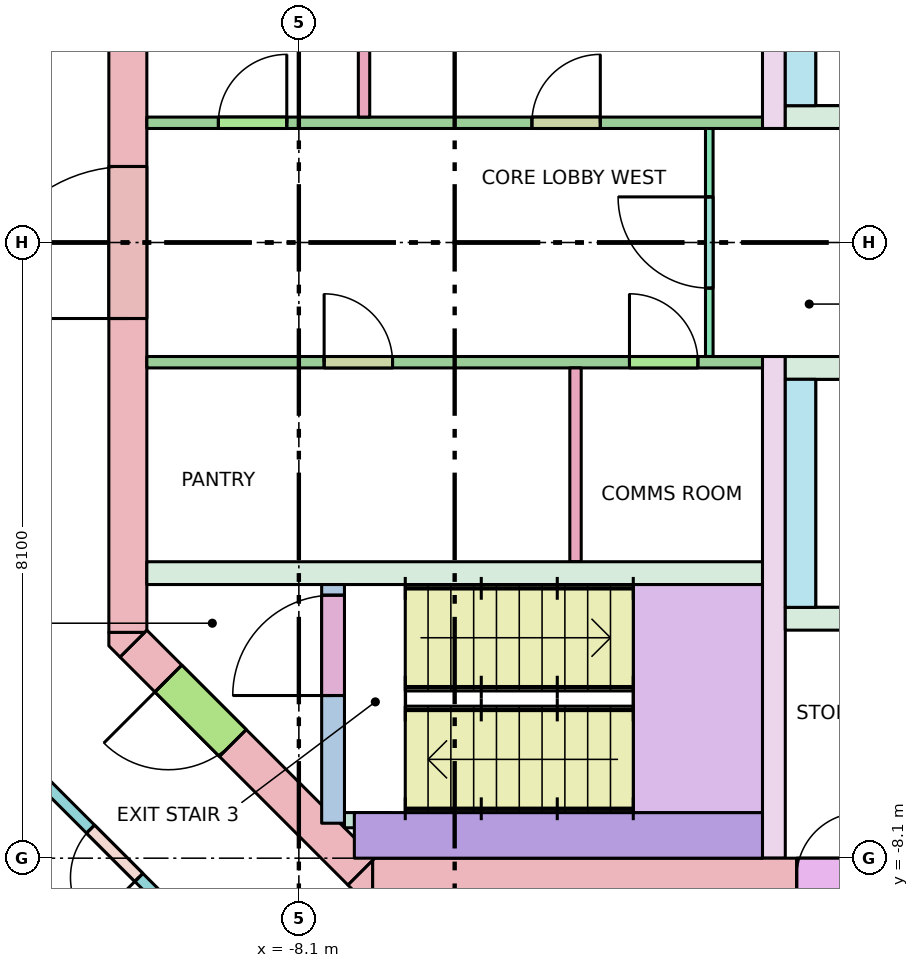
"""IFC4 building model, lengths in metres.
Left out: names, types, materials, properties, quantities, classifications, styles, units other than length and angle.
Written with IfcOpenShell. Run it as: python <this file> out.ifc"""

import sys

from ifc_helpers import new_model, si_unit, direction, frame, frame_2d, origin, place, context, subcontext, project, spatial, polyline, rectangle, outline, extrude, element, fill, save


model = new_model("IFC4")
c1 = context("Model", 3, precision=1e-05, world=origin(), true_north=direction((0.0, 1.0)))
c2 = subcontext(c1, "Body", "Model", "MODEL_VIEW")
j1 = project(units=[si_unit("LENGTHUNIT", "METRE"), si_unit("PLANEANGLEUNIT", "RADIAN")], contexts=[c1])
p1 = place(None, origin())
s1 = spatial("IfcSite", under=j1, at=p1, CompositionType="ELEMENT")
p2 = place(p1, origin())
s2 = spatial("IfcBuilding", under=s1, at=p2, CompositionType="ELEMENT")
p3 = place(p2, frame((0.0, 0.0, 272.3)))
s3 = spatial("IfcBuildingStorey", under=s2, at=p3, CompositionType="ELEMENT", Elevation=272.3)
p4 = place(p3, frame((-7.13, -8.35, -0.28), z_axis=(0.0, 0.0, 1.0), x_axis=(1.0, 0.0, 0.0)))
e1 = element("IfcWall", 1, at=p4, inside=s3, PredefinedType="SHEAR", context=c2, shape_type="SweptSolid", body=[
    extrude(rectangle(XDim=14.26, YDim=0.5, at=frame_2d((7.13, 0.0))), origin(), (0.0, 0.0, 1.0), 3.7),
])
p5 = place(p4, frame((8.08, 0.0, 0.28)))
e2 = element("IfcOpeningElement", 2, at=p5, cuts=e1, PredefinedType="OPENING", context=c2, shape_type="SweptSolid", body=[
    extrude(rectangle(XDim=0.7, YDim=2.1, at=frame_2d((0.35, 1.05))), frame((0.0, 0.26, 0.0), z_axis=(0.0, -1.0, 0.0), x_axis=(1.0, 0.0, 0.0)), (0.0, 0.0, 1.0), 0.52),
])
p6 = place(p4, frame((5.58, 0.0, 0.28)))
e3 = element("IfcOpeningElement", 3, at=p6, cuts=e1, PredefinedType="OPENING", context=c2, shape_type="SweptSolid", body=[
    extrude(rectangle(XDim=0.85, YDim=2.1, at=frame_2d((0.425, 1.05))), frame((0.0, 0.26, 0.0), z_axis=(0.0, -1.0, 0.0), x_axis=(1.0, 0.0, 0.0)), (0.0, 0.0, 1.0), 0.52),
])
p7 = place(p4, frame((6.88, 0.0, 0.28)))
e4 = element("IfcOpeningElement", 4, at=p7, cuts=e1, PredefinedType="OPENING", context=c2, shape_type="SweptSolid", body=[
    extrude(rectangle(XDim=0.85, YDim=2.1, at=frame_2d((0.425, 1.05))), frame((0.0, 0.26, 0.0), z_axis=(0.0, -1.0, 0.0), x_axis=(1.0, 0.0, 0.0)), (0.0, 0.0, 1.0), 0.52),
])
p8 = place(p4, frame((9.445, 0.0, 0.28)))
e5 = element("IfcOpeningElement", 5, at=p8, cuts=e1, PredefinedType="OPENING", context=c2, shape_type="SweptSolid", body=[
    extrude(rectangle(XDim=0.9, YDim=2.1, at=frame_2d((0.45, 1.05))), frame((0.0, 0.26, 0.0), z_axis=(0.0, -1.0, 0.0), x_axis=(1.0, 0.0, 0.0)), (0.0, 0.0, 1.0), 0.52),
])
p9 = place(p4, frame((11.431, 0.0, 0.28)))
e6 = element("IfcOpeningElement", 6, at=p9, cuts=e1, PredefinedType="OPENING", context=c2, shape_type="SweptSolid", body=[
    extrude(rectangle(XDim=0.9, YDim=2.1, at=frame_2d((0.45, 1.05))), frame((0.0, 0.26, 0.0), z_axis=(0.0, -1.0, 0.0), x_axis=(1.0, 0.0, 0.0)), (0.0, 0.0, 1.0), 0.52),
])
p10 = place(p3, frame((-10.35, -5.13, -0.28), z_axis=(0.0, 0.0, 1.0), x_axis=(0.0, 1.0, 0.0)))
e7 = element("IfcWall", 7, at=p10, inside=s3, PredefinedType="SHEAR", context=c2, shape_type="SweptSolid", body=[
    extrude(rectangle(XDim=10.26, YDim=0.5, at=frame_2d((5.13, 0.0))), origin(), (0.0, 0.0, 1.0), 3.7),
])
p11 = place(p10, frame((4.13, 0.0, 0.28)))
e8 = element("IfcOpeningElement", 8, at=p11, cuts=e7, PredefinedType="OPENING", context=c2, shape_type="SweptSolid", body=[
    extrude(rectangle(XDim=2.0, YDim=2.1, at=frame_2d((1.0, 1.05))), frame((0.0, 0.26, 0.0), z_axis=(0.0, -1.0, 0.0), x_axis=(1.0, 0.0, 0.0)), (0.0, 0.0, 1.0), 0.52),
])
p12 = place(p3, frame((-7.277, -8.277, -0.28), z_axis=(0.0, 0.0, 1.0), x_axis=(-0.707106781187, 0.707106781187, 0.0)))
e9 = element("IfcWall", 9, at=p12, inside=s3, PredefinedType="SHEAR", context=c2, shape_type="SweptSolid", body=[
    extrude(rectangle(XDim=4.243, YDim=0.5, at=frame_2d((2.121, 0.0))), origin(), (0.0, 0.0, 1.0), 3.7),
])
p13 = place(p12, frame((2.393, 0.0, 0.28)))
e10 = element("IfcOpeningElement", 10, at=p13, cuts=e9, PredefinedType="OPENING", context=c2, shape_type="SweptSolid", body=[
    extrude(rectangle(XDim=1.2, YDim=2.1, at=frame_2d((0.6, 1.05))), frame((0.0, 0.26, 0.0), z_axis=(0.0, -1.0, 0.0), x_axis=(1.0, 0.0, 0.0)), (0.0, 0.0, 1.0), 0.52),
])
p14 = place(p3, frame((0.0, 0.0, -0.28)))
e11 = element("IfcWall", 11, at=p14, inside=s3, PredefinedType="SHEAR", context=c2, shape_type="SweptSolid", body=[
    extrude(outline(polyline([(-7.307, -8.6), (-7.454, -8.454), (-7.13, -8.13), (-7.13, -8.6), (-7.307, -8.6)])), origin(), (0.0, 0.0, 1.0), 3.7),
])
p15 = place(p3, frame((0.0, 0.0, -0.28)))
e12 = element("IfcWall", 12, at=p15, inside=s3, PredefinedType="SHEAR", context=c2, shape_type="SweptSolid", body=[
    extrude(outline(polyline([(-10.6, -5.307), (-10.6, -5.13), (-10.13, -5.13), (-10.454, -5.454), (-10.6, -5.307)])), origin(), (0.0, 0.0, 1.0), 3.7),
])
p16 = place(p3, frame((-10.1, -4.35, 0.0), z_axis=(0.0, 0.0, 1.0), x_axis=(1.0, 0.0, 0.0)))
e13 = element("IfcWall", 13, at=p16, inside=s3, PredefinedType="SOLIDWALL", context=c2, shape_type="SweptSolid", body=[
    extrude(rectangle(XDim=8.1, YDim=0.3, at=frame_2d((4.05, 0.0))), origin(), (0.0, 0.0, 1.0), 3.42),
])
for number, where, z_axis, x_axis in (
    (14, (-1.85, 1.5, 0.0), (0.0, 0.0, 1.0), (0.0, 1.0, 0.0)),
    (15, (-1.85, -8.1, 0.0), (0.0, 0.0, 1.0), (0.0, 1.0, 0.0)),
):
    element("IfcWall", number, at=place(p3, frame(where, z_axis=z_axis, x_axis=x_axis)), inside=s3, PredefinedType="SHEAR", context=c2, shape_type="SweptSolid", body=[
        extrude(rectangle(XDim=6.6, YDim=0.3, at=frame_2d((3.3, 0.0))), origin(), (0.0, 0.0, 1.0), 3.42),
    ])
p17 = place(p3, frame((-1.7, 1.65, 0.0), z_axis=(0.0, 0.0, 1.0), x_axis=(1.0, 0.0, 0.0)))
e16 = element("IfcWall", 16, at=p17, inside=s3, PredefinedType="SOLIDWALL", context=c2, shape_type="SweptSolid", body=[
    extrude(rectangle(XDim=3.4, YDim=0.3, at=frame_2d((1.7, 0.0))), origin(), (0.0, 0.0, 1.0), 3.42),
])
p18 = place(p17, frame((1.15, 0.0, 0.0)))
e17 = element("IfcOpeningElement", 17, at=p18, cuts=e16, PredefinedType="OPENING", context=c2, shape_type="SweptSolid", body=[
    extrude(rectangle(XDim=1.1, YDim=2.1, at=frame_2d((0.55, 1.05))), frame((0.0, 0.16, 0.0), z_axis=(0.0, -1.0, 0.0), x_axis=(1.0, 0.0, 0.0)), (0.0, 0.0, 1.0), 0.32),
])
p19 = place(p3, frame((-1.7, -1.65, 0.0), z_axis=(0.0, 0.0, 1.0), x_axis=(1.0, 0.0, 0.0)))
e18 = element("IfcWall", 18, at=p19, inside=s3, PredefinedType="SOLIDWALL", context=c2, shape_type="SweptSolid", body=[
    extrude(rectangle(XDim=3.4, YDim=0.3, at=frame_2d((1.7, 0.0))), origin(), (0.0, 0.0, 1.0), 3.42),
])
p20 = place(p19, frame((1.15, 0.0, 0.0)))
e19 = element("IfcOpeningElement", 19, at=p20, cuts=e18, PredefinedType="OPENING", context=c2, shape_type="SweptSolid", body=[
    extrude(rectangle(XDim=1.1, YDim=2.1, at=frame_2d((0.55, 1.05))), frame((0.0, 0.16, 0.0), z_axis=(0.0, -1.0, 0.0), x_axis=(1.0, 0.0, 0.0)), (0.0, 0.0, 1.0), 0.32),
])
for number, where, z_axis, x_axis in (
    (20, (-1.5, 1.8, 0.0), (0.0, 0.0, 1.0), (0.0, 1.0, 0.0)),
    (21, (-1.5, -4.8, 0.0), (0.0, 0.0, 1.0), (0.0, 1.0, 0.0)),
):
    element("IfcWall", number, at=place(p3, frame(where, z_axis=z_axis, x_axis=x_axis)), inside=s3, PredefinedType="SOLIDWALL", context=c2, shape_type="SweptSolid", body=[
        extrude(rectangle(XDim=3.0, YDim=0.4, at=frame_2d((1.5, 0.0))), origin(), (0.0, 0.0, 1.0), 3.42),
    ])
p21 = place(p3, frame((-1.7, -4.95, 0.0), z_axis=(0.0, 0.0, 1.0), x_axis=(1.0, 0.0, 0.0)))
e22 = element("IfcWall", 22, at=p21, inside=s3, PredefinedType="SOLIDWALL", context=c2, shape_type="SweptSolid", body=[
    extrude(rectangle(XDim=3.4, YDim=0.3, at=frame_2d((1.7, 0.0))), origin(), (0.0, 0.0, 1.0), 3.42),
])
p22 = place(p3, frame((-7.65, -7.64, 0.0), z_axis=(0.0, 0.0, 1.0), x_axis=(0.0, 1.0, 0.0)))
e23 = element("IfcWall", 23, at=p22, inside=s3, PredefinedType="SHEAR", context=c2, shape_type="SweptSolid", body=[
    extrude(rectangle(XDim=3.14, YDim=0.3, at=frame_2d((1.57, 0.0))), origin(), (0.0, 0.0, 1.0), 3.42),
])
p23 = place(p22, frame((1.68, 0.0, 0.0)))
e24 = element("IfcOpeningElement", 24, at=p23, cuts=e23, PredefinedType="OPENING", context=c2, shape_type="SweptSolid", body=[
    extrude(rectangle(XDim=1.32, YDim=2.1, at=frame_2d((0.66, 1.05))), frame((0.0, 0.16, 0.0), z_axis=(0.0, -1.0, 0.0), x_axis=(1.0, 0.0, 0.0)), (0.0, 0.0, 1.0), 0.32),
])
p24 = place(p3, frame((-7.5, -7.6, 0.0), z_axis=(0.0, 0.0, 1.0), x_axis=(1.0, 0.0, 0.0)))
e25 = element("IfcWall", 25, at=p24, inside=s3, PredefinedType="SHEAR", context=c2, shape_type="SweptSolid", body=[
    extrude(rectangle(XDim=0.6, YDim=0.2, at=frame_2d((0.3, 0.0))), origin(), (0.0, 0.0, 1.0), 3.42),
])
p25 = place(p3, frame((-7.37, -7.8, 0.0), z_axis=(0.0, 0.0, 1.0), x_axis=(1.0, 0.0, 0.0)))
e26 = element("IfcWall", 26, at=p25, inside=s3, PredefinedType="SHEAR", context=c2, shape_type="SweptSolid", body=[
    extrude(rectangle(XDim=5.37, YDim=0.6, at=frame_2d((2.685, 0.0))), origin(), (0.0, 0.0, 1.0), 3.42),
])
p26 = place(p3, frame((-2.7, -1.5, 0.0), z_axis=(0.0, 0.0, 1.0), x_axis=(0.0, 1.0, 0.0)))
e27 = element("IfcWall", 27, at=p26, inside=s3, PredefinedType="PARTITIONING", context=c2, shape_type="SweptSolid", body=[
    extrude(rectangle(XDim=3.0, YDim=0.1, at=frame_2d((1.5, 0.0))), origin(), (0.0, 0.0, 1.0), 3.42),
])
p27 = place(p26, frame((0.9, 0.0, 0.0)))
e28 = element("IfcOpeningElement", 28, at=p27, cuts=e27, PredefinedType="OPENING", context=c2, shape_type="SweptSolid", body=[
    extrude(rectangle(XDim=1.2, YDim=2.1, at=frame_2d((0.6, 1.05))), frame((0.0, 0.06, 0.0), z_axis=(0.0, -1.0, 0.0), x_axis=(1.0, 0.0, 0.0)), (0.0, 0.0, 1.0), 0.12),
])
for number, where, z_axis, x_axis in (
    (29, (-7.242, 1.65, 0.0), (0.0, 0.0, 1.0), (0.0, 1.0, 0.0)),
    (30, (-4.46, -4.2, 0.0), (0.0, 0.0, 1.0), (0.0, 1.0, 0.0)),
):
    element("IfcWall", number, at=place(p3, frame(where, z_axis=z_axis, x_axis=x_axis)), inside=s3, PredefinedType="PARTITIONING", context=c2, shape_type="SweptSolid", body=[
        extrude(rectangle(XDim=2.55, YDim=0.15, at=frame_2d((1.275, 0.0))), origin(), (0.0, 0.0, 1.0), 3.42),
    ])
p28 = place(p3, frame((-10.1, 1.575, 0.0), z_axis=(0.0, 0.0, 1.0), x_axis=(1.0, 0.0, 0.0)))
e31 = element("IfcWall", 31, at=p28, inside=s3, PredefinedType="PARTITIONING", context=c2, shape_type="SweptSolid", body=[
    extrude(rectangle(XDim=8.1, YDim=0.15, at=frame_2d((4.05, 0.0))), origin(), (0.0, 0.0, 1.0), 3.42),
])
p29 = place(p28, frame((0.941, 0.0, 0.0)))
e32 = element("IfcOpeningElement", 32, at=p29, cuts=e31, PredefinedType="OPENING", context=c2, shape_type="SweptSolid", body=[
    extrude(rectangle(XDim=0.9, YDim=2.1, at=frame_2d((0.45, 1.05))), frame((0.0, 0.085, 0.0), z_axis=(0.0, -1.0, 0.0), x_axis=(1.0, 0.0, 0.0)), (0.0, 0.0, 1.0), 0.17),
])
p30 = place(p28, frame((5.066, 0.0, 0.0)))
e33 = element("IfcOpeningElement", 33, at=p30, cuts=e31, PredefinedType="OPENING", context=c2, shape_type="SweptSolid", body=[
    extrude(rectangle(XDim=0.9, YDim=2.1, at=frame_2d((0.45, 1.05))), frame((0.0, 0.085, 0.0), z_axis=(0.0, -1.0, 0.0), x_axis=(1.0, 0.0, 0.0)), (0.0, 0.0, 1.0), 0.17),
])
p31 = place(p3, frame((-10.1, -1.575, 0.0), z_axis=(0.0, 0.0, 1.0), x_axis=(1.0, 0.0, 0.0)))
e34 = element("IfcWall", 34, at=p31, inside=s3, PredefinedType="PARTITIONING", context=c2, shape_type="SweptSolid", body=[
    extrude(rectangle(XDim=8.1, YDim=0.15, at=frame_2d((4.05, 0.0))), origin(), (0.0, 0.0, 1.0), 3.42),
])
p32 = place(p31, frame((2.333, 0.0, 0.0)))
e35 = element("IfcOpeningElement", 35, at=p32, cuts=e34, PredefinedType="OPENING", context=c2, shape_type="SweptSolid", body=[
    extrude(rectangle(XDim=0.9, YDim=2.1, at=frame_2d((0.45, 1.05))), frame((0.0, 0.085, 0.0), z_axis=(0.0, -1.0, 0.0), x_axis=(1.0, 0.0, 0.0)), (0.0, 0.0, 1.0), 0.17),
])
p33 = place(p31, frame((6.35, 0.0, 0.0)))
e36 = element("IfcOpeningElement", 36, at=p33, cuts=e34, PredefinedType="OPENING", context=c2, shape_type="SweptSolid", body=[
    extrude(rectangle(XDim=0.9, YDim=2.1, at=frame_2d((0.45, 1.05))), frame((0.0, 0.085, 0.0), z_axis=(0.0, -1.0, 0.0), x_axis=(1.0, 0.0, 0.0)), (0.0, 0.0, 1.0), 0.17),
])
p34 = place(p3, frame((-8.121, -10.438, 0.0), z_axis=(0.0, 0.0, 1.0), x_axis=(-0.707106781187, 0.707106781187, 0.0)))
e37 = element("IfcWall", 37, at=p34, inside=s3, PredefinedType="PARTITIONING", context=c2, shape_type="SweptSolid", body=[
    extrude(rectangle(XDim=6.105, YDim=0.15, at=frame_2d((3.053, 0.0))), origin(), (0.0, 0.0, 1.0), 2.52),
])
p35 = place(p34, frame((0.344, 0.0, 0.0)))
e38 = element("IfcOpeningElement", 38, at=p35, cuts=e37, PredefinedType="OPENING", context=c2, shape_type="SweptSolid", body=[
    extrude(rectangle(XDim=1.0, YDim=2.1, at=frame_2d((0.5, 1.05))), frame((0.0, 0.085, 0.0), z_axis=(0.0, -1.0, 0.0), x_axis=(1.0, 0.0, 0.0)), (0.0, 0.0, 1.0), 0.17),
])
p36 = place(p34, frame((2.948, 0.0, 0.0)))
e39 = element("IfcOpeningElement", 39, at=p36, cuts=e37, PredefinedType="OPENING", context=c2, shape_type="SweptSolid", body=[
    extrude(rectangle(XDim=0.9, YDim=2.1, at=frame_2d((0.45, 1.05))), frame((0.0, 0.085, 0.0), z_axis=(0.0, -1.0, 0.0), x_axis=(1.0, 0.0, 0.0)), (0.0, 0.0, 1.0), 0.17),
])
p37 = place(p23, origin())
e40 = element("IfcDoor", 40, at=p37, inside=s3, OperationType="DOUBLE_DOOR_SINGLE_SWING", PredefinedType="DOOR", context=c2, shape_type="SweptSolid", body=[
    extrude(rectangle(XDim=1.32, YDim=2.1, at=frame_2d((0.66, 1.05))), frame((0.0, 0.025, 0.0), z_axis=(0.0, -1.0, 0.0), x_axis=(1.0, 0.0, 0.0)), (0.0, 0.0, 1.0), 0.05),
])
fill(e24, e40)
p38 = place(p13, origin())
e41 = element("IfcDoor", 41, at=p38, inside=s3, OperationType="SINGLE_SWING_RIGHT", PredefinedType="DOOR", context=c2, shape_type="SweptSolid", body=[
    extrude(rectangle(XDim=1.2, YDim=2.1, at=frame_2d((0.6, 1.05))), frame((0.0, 0.025, 0.0), z_axis=(0.0, -1.0, 0.0), x_axis=(1.0, 0.0, 0.0)), (0.0, 0.0, 1.0), 0.05),
])
fill(e10, e41)
p39 = place(p11, origin())
e42 = element("IfcDoor", 42, at=p39, inside=s3, OperationType="DOUBLE_DOOR_SINGLE_SWING", PredefinedType="DOOR", context=c2, shape_type="SweptSolid", body=[
    extrude(rectangle(XDim=2.0, YDim=2.1, at=frame_2d((1.0, 1.05))), frame((0.0, 0.025, 0.0), z_axis=(0.0, -1.0, 0.0), x_axis=(1.0, 0.0, 0.0)), (0.0, 0.0, 1.0), 0.05),
])
fill(e8, e42)
p40 = place(p27, origin())
e43 = element("IfcDoor", 43, at=p40, inside=s3, OperationType="SINGLE_SWING_RIGHT", PredefinedType="DOOR", context=c2, shape_type="SweptSolid", body=[
    extrude(rectangle(XDim=1.2, YDim=2.1, at=frame_2d((0.6, 1.05))), frame((0.0, 0.025, 0.0), z_axis=(0.0, -1.0, 0.0), x_axis=(1.0, 0.0, 0.0)), (0.0, 0.0, 1.0), 0.05),
])
fill(e28, e43)
p41 = place(p6, origin())
e44 = element("IfcDoor", 44, at=p41, inside=s3, OperationType="SINGLE_SWING_RIGHT", PredefinedType="DOOR", context=c2, shape_type="SweptSolid", body=[
    extrude(rectangle(XDim=0.85, YDim=2.1, at=frame_2d((0.425, 1.05))), frame((0.0, 0.025, 0.0), z_axis=(0.0, -1.0, 0.0), x_axis=(1.0, 0.0, 0.0)), (0.0, 0.0, 1.0), 0.05),
])
fill(e3, e44)
p42 = place(p29, origin())
e45 = element("IfcDoor", 45, at=p42, inside=s3, OperationType="SINGLE_SWING_RIGHT", PredefinedType="DOOR", context=c2, shape_type="SweptSolid", body=[
    extrude(rectangle(XDim=0.9, YDim=2.1, at=frame_2d((0.45, 1.05))), frame((0.0, 0.025, 0.0), z_axis=(0.0, -1.0, 0.0), x_axis=(1.0, 0.0, 0.0)), (0.0, 0.0, 1.0), 0.05),
])
fill(e32, e45)
p43 = place(p30, origin())
e46 = element("IfcDoor", 46, at=p43, inside=s3, OperationType="SINGLE_SWING_RIGHT", PredefinedType="DOOR", context=c2, shape_type="SweptSolid", body=[
    extrude(rectangle(XDim=0.9, YDim=2.1, at=frame_2d((0.45, 1.05))), frame((0.0, 0.025, 0.0), z_axis=(0.0, -1.0, 0.0), x_axis=(1.0, 0.0, 0.0)), (0.0, 0.0, 1.0), 0.05),
])
fill(e33, e46)
p44 = place(p32, origin())
e47 = element("IfcDoor", 47, at=p44, inside=s3, OperationType="SINGLE_SWING_LEFT", PredefinedType="DOOR", context=c2, shape_type="SweptSolid", body=[
    extrude(rectangle(XDim=0.9, YDim=2.1, at=frame_2d((0.45, 1.05))), frame((0.0, 0.025, 0.0), z_axis=(0.0, -1.0, 0.0), x_axis=(1.0, 0.0, 0.0)), (0.0, 0.0, 1.0), 0.05),
])
fill(e35, e47)
p45 = place(p33, origin())
e48 = element("IfcDoor", 48, at=p45, inside=s3, OperationType="SINGLE_SWING_LEFT", PredefinedType="DOOR", context=c2, shape_type="SweptSolid", body=[
    extrude(rectangle(XDim=0.9, YDim=2.1, at=frame_2d((0.45, 1.05))), frame((0.0, 0.025, 0.0), z_axis=(0.0, -1.0, 0.0), x_axis=(1.0, 0.0, 0.0)), (0.0, 0.0, 1.0), 0.05),
])
fill(e36, e48)
p46 = place(p36, origin())
e49 = element("IfcDoor", 49, at=p46, inside=s3, OperationType="SINGLE_SWING_LEFT", PredefinedType="DOOR", context=c2, shape_type="SweptSolid", body=[
    extrude(rectangle(XDim=0.9, YDim=2.1, at=frame_2d((0.45, 1.05))), frame((0.0, 0.025, 0.0), z_axis=(0.0, -1.0, 0.0), x_axis=(1.0, 0.0, 0.0)), (0.0, 0.0, 1.0), 0.05),
])
fill(e39, e49)
save(model, sys.argv[1])
